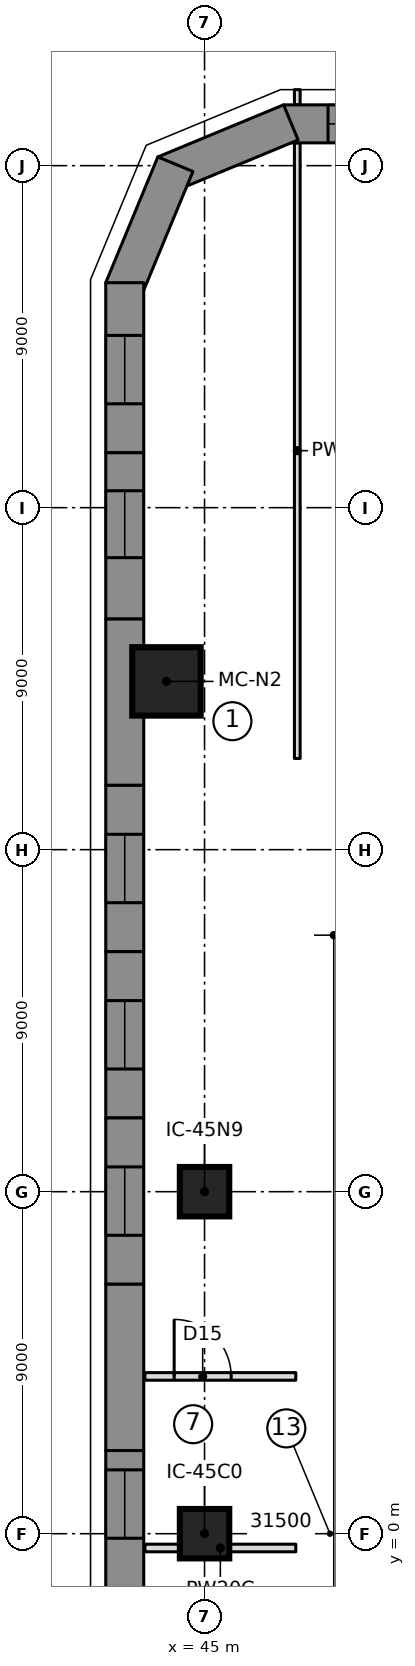
"""IFC4 building model, lengths in metres.
Left out: names, types, materials, properties, quantities, classifications, styles, units other than length and angle.
Written with IfcOpenShell. Run it as: python <this file> out.ifc"""

import sys

from ifc_helpers import new_model, si_unit, direction, frame, frame_2d, origin, origin_2d, place, context, subcontext, project, spatial, polyline, rectangle, outline, extrude, element, fill, save


model = new_model("IFC4")
c1 = context("Model", 3, precision=1e-05, world=origin(), true_north=direction((0.0, 1.0)))
c2 = subcontext(c1, "Body", "Model", "MODEL_VIEW")
j1 = project(units=[si_unit("LENGTHUNIT", "METRE"), si_unit("PLANEANGLEUNIT", "RADIAN")], contexts=[c1])
p1 = place(None, origin())
s1 = spatial("IfcSite", under=j1, at=p1, CompositionType="ELEMENT")
p2 = place(p1, origin())
s2 = spatial("IfcBuilding", under=s1, at=p2, CompositionType="ELEMENT")
p3 = place(p2, frame((0.0, 0.0, 24.0)))
s3 = spatial("IfcBuildingStorey", under=s2, at=p3, CompositionType="ELEMENT", Elevation=24.0)
p4 = place(p3, frame((43.998, 22.428, 0.0), z_axis=(0.0, 0.0, 1.0), x_axis=(1.0, 0.0, 0.0)))
e1 = element("IfcColumn", 1, at=p4, inside=s3, PredefinedType="COLUMN", context=c2, shape_type="SweptSolid", body=[
    extrude(rectangle(XDim=1.8, YDim=1.8, at=origin_2d()), origin(), (0.0, 0.0, 1.0), 5.0),
])
for number, where, z_axis, x_axis in (
    (2, (45.0, 0.0, 0.0), (0.0, 0.0, 1.0), (1.0, 0.0, 0.0)),
    (3, (45.0, 9.0, 0.0), (0.0, 0.0, 1.0), (1.0, 0.0, 0.0)),
):
    element("IfcColumn", number, at=place(p3, frame(where, z_axis=z_axis, x_axis=x_axis)), inside=s3, PredefinedType="COLUMN", context=c2, shape_type="SweptSolid", body=[
        extrude(rectangle(XDim=1.3, YDim=1.3, at=origin_2d()), origin(), (0.0, 0.0, 1.0), 5.0),
    ])
p5 = place(p3, frame((51.119, 37.1, 0.0), z_axis=(0.0, 0.0, 1.0), x_axis=(-1.0, 0.0, 0.0)))
e4 = element("IfcWall", 4, at=p5, inside=s3, PredefinedType="NOTDEFINED", context=c2, shape_type="SweptSolid", body=[
    extrude(outline(polyline([(0.0, -0.5), (4.04, -0.5), (3.841, 0.5), (0.0, 0.5), (0.0, -0.5)])), origin(), (0.0, 0.0, 1.0), 4.7),
])
p6 = place(p5, frame((1.07, 0.0, 0.9)))
e5 = element("IfcOpeningElement", 5, at=p6, cuts=e4, PredefinedType="OPENING", context=c2, shape_type="SweptSolid", body=[
    extrude(rectangle(XDim=1.8, YDim=2.4, at=frame_2d((0.9, 1.2))), frame((0.0, 0.51, 0.0), z_axis=(0.0, -1.0, 0.0), x_axis=(1.0, 0.0, 0.0)), (0.0, 0.0, 1.0), 1.02),
])
p7 = place(p3, frame((47.179, 37.1, 0.0), z_axis=(0.0, 0.0, 1.0), x_axis=(-0.923862365102, -0.382724875529, 0.0)))
e6 = element("IfcWall", 6, at=p7, inside=s3, PredefinedType="NOTDEFINED", context=c2, shape_type="SweptSolid", body=[
    extrude(outline(polyline([(-0.1, -0.5), (3.482, -0.5), (3.068, 0.5), (0.1, 0.5), (-0.1, -0.5)])), origin(), (0.0, 0.0, 1.0), 4.7),
])
p8 = place(p3, frame((44.153, 35.847, 0.0), z_axis=(0.0, 0.0, 1.0), x_axis=(-0.382724875529, -0.923862365102, 0.0)))
e7 = element("IfcWall", 7, at=p8, inside=s3, PredefinedType="NOTDEFINED", context=c2, shape_type="SweptSolid", body=[
    extrude(outline(polyline([(-0.207, -0.5), (3.375, -0.5), (3.175, 0.5), (0.207, 0.5), (-0.207, -0.5)])), origin(), (0.0, 0.0, 1.0), 4.7),
])
p9 = place(p3, frame((42.9, 32.821, 0.0), z_axis=(0.0, 0.0, 1.0), x_axis=(0.0, -1.0, 0.0)))
e8 = element("IfcWall", 8, at=p9, inside=s3, PredefinedType="NOTDEFINED", context=c2, shape_type="SweptSolid", body=[
    extrude(outline(polyline([(-0.1, -0.5), (4.376, -0.5), (4.376, 0.5), (0.1, 0.5), (-0.1, -0.5)])), origin(), (0.0, 0.0, 1.0), 4.7),
])
p10 = place(p9, frame((1.288, 0.0, 0.9)))
e9 = element("IfcOpeningElement", 9, at=p10, cuts=e8, PredefinedType="OPENING", context=c2, shape_type="SweptSolid", body=[
    extrude(rectangle(XDim=1.8, YDim=2.4, at=frame_2d((0.9, 1.2))), frame((0.0, 0.51, 0.0), z_axis=(0.0, -1.0, 0.0), x_axis=(1.0, 0.0, 0.0)), (0.0, 0.0, 1.0), 1.02),
])
p11 = place(p3, frame((42.9, 28.445, 0.0), z_axis=(0.0, 0.0, 1.0), x_axis=(0.0, -1.0, 0.0)))
e10 = element("IfcWall", 10, at=p11, inside=s3, PredefinedType="NOTDEFINED", context=c2, shape_type="SweptSolid", body=[
    extrude(outline(polyline([(0.0, -0.5), (4.376, -0.5), (4.376, 0.5), (0.0, 0.5), (0.0, -0.5)])), origin(), (0.0, 0.0, 1.0), 4.7),
])
p12 = place(p11, frame((1.0, 0.0, 0.9)))
e11 = element("IfcOpeningElement", 11, at=p12, cuts=e10, PredefinedType="OPENING", context=c2, shape_type="SweptSolid", body=[
    extrude(rectangle(XDim=1.76, YDim=2.4, at=frame_2d((0.88, 1.2))), frame((0.0, 0.51, 0.0), z_axis=(0.0, -1.0, 0.0), x_axis=(1.0, 0.0, 0.0)), (0.0, 0.0, 1.0), 1.02),
])
p13 = place(p3, frame((42.9, 24.069, 0.0), z_axis=(0.0, 0.0, 1.0), x_axis=(0.0, -1.0, 0.0)))
e12 = element("IfcWall", 12, at=p13, inside=s3, PredefinedType="NOTDEFINED", context=c2, shape_type="SweptSolid", body=[
    extrude(outline(polyline([(0.0, -0.5), (4.376, -0.5), (4.376, 0.5), (0.0, 0.5), (0.0, -0.5)])), origin(), (0.0, 0.0, 1.0), 4.7),
])
p14 = place(p3, frame((42.9, 19.693, 0.0), z_axis=(0.0, 0.0, 1.0), x_axis=(0.0, -1.0, 0.0)))
e13 = element("IfcWall", 13, at=p14, inside=s3, PredefinedType="NOTDEFINED", context=c2, shape_type="SweptSolid", body=[
    extrude(outline(polyline([(0.0, -0.5), (4.376, -0.5), (4.376, 0.5), (0.0, 0.5), (0.0, -0.5)])), origin(), (0.0, 0.0, 1.0), 4.7),
])
p15 = place(p14, frame((1.288, 0.0, 0.9)))
e14 = element("IfcOpeningElement", 14, at=p15, cuts=e13, PredefinedType="OPENING", context=c2, shape_type="SweptSolid", body=[
    extrude(rectangle(XDim=1.8, YDim=2.4, at=frame_2d((0.9, 1.2))), frame((0.0, 0.51, 0.0), z_axis=(0.0, -1.0, 0.0), x_axis=(1.0, 0.0, 0.0)), (0.0, 0.0, 1.0), 1.02),
])
p16 = place(p3, frame((42.9, 15.316, 0.0), z_axis=(0.0, 0.0, 1.0), x_axis=(0.0, -1.0, 0.0)))
e15 = element("IfcWall", 15, at=p16, inside=s3, PredefinedType="NOTDEFINED", context=c2, shape_type="SweptSolid", body=[
    extrude(outline(polyline([(0.0, -0.5), (4.376, -0.5), (4.376, 0.5), (0.0, 0.5), (0.0, -0.5)])), origin(), (0.0, 0.0, 1.0), 4.7),
])
p17 = place(p16, frame((1.288, 0.0, 0.9)))
e16 = element("IfcOpeningElement", 16, at=p17, cuts=e15, PredefinedType="OPENING", context=c2, shape_type="SweptSolid", body=[
    extrude(rectangle(XDim=1.8, YDim=2.4, at=frame_2d((0.9, 1.2))), frame((0.0, 0.51, 0.0), z_axis=(0.0, -1.0, 0.0), x_axis=(1.0, 0.0, 0.0)), (0.0, 0.0, 1.0), 1.02),
])
p18 = place(p3, frame((42.9, 10.94, 0.0), z_axis=(0.0, 0.0, 1.0), x_axis=(0.0, -1.0, 0.0)))
e17 = element("IfcWall", 17, at=p18, inside=s3, PredefinedType="NOTDEFINED", context=c2, shape_type="SweptSolid", body=[
    extrude(outline(polyline([(0.0, -0.5), (4.376, -0.5), (4.376, 0.5), (0.0, 0.5), (0.0, -0.5)])), origin(), (0.0, 0.0, 1.0), 4.7),
])
p19 = place(p18, frame((1.288, 0.0, 0.9)))
e18 = element("IfcOpeningElement", 18, at=p19, cuts=e17, PredefinedType="OPENING", context=c2, shape_type="SweptSolid", body=[
    extrude(rectangle(XDim=1.8, YDim=2.4, at=frame_2d((0.9, 1.2))), frame((0.0, 0.51, 0.0), z_axis=(0.0, -1.0, 0.0), x_axis=(1.0, 0.0, 0.0)), (0.0, 0.0, 1.0), 1.02),
])
p20 = place(p3, frame((42.9, 6.564, 0.0), z_axis=(0.0, 0.0, 1.0), x_axis=(0.0, -1.0, 0.0)))
e19 = element("IfcWall", 19, at=p20, inside=s3, PredefinedType="NOTDEFINED", context=c2, shape_type="SweptSolid", body=[
    extrude(outline(polyline([(0.0, -0.5), (4.376, -0.5), (4.376, 0.5), (0.0, 0.5), (0.0, -0.5)])), origin(), (0.0, 0.0, 1.0), 4.7),
])
p21 = place(p3, frame((42.9, 2.188, 0.0), z_axis=(0.0, 0.0, 1.0), x_axis=(0.0, -1.0, 0.0)))
e20 = element("IfcWall", 20, at=p21, inside=s3, PredefinedType="NOTDEFINED", context=c2, shape_type="SweptSolid", body=[
    extrude(outline(polyline([(0.0, -0.5), (4.376, -0.5), (4.376, 0.5), (0.0, 0.5), (0.0, -0.5)])), origin(), (0.0, 0.0, 1.0), 4.7),
])
p22 = place(p21, frame((0.508, 0.0, 0.9)))
e21 = element("IfcOpeningElement", 21, at=p22, cuts=e20, PredefinedType="OPENING", context=c2, shape_type="SweptSolid", body=[
    extrude(rectangle(XDim=1.8, YDim=2.4, at=frame_2d((0.9, 1.2))), frame((0.0, 0.51, 0.0), z_axis=(0.0, -1.0, 0.0), x_axis=(1.0, 0.0, 0.0)), (0.0, 0.0, 1.0), 1.02),
])
p23 = place(p3, frame((43.43, -0.376, 0.0), z_axis=(0.0, 0.0, 1.0), x_axis=(1.0, 0.0, 0.0)))
e22 = element("IfcWall", 22, at=p23, inside=s3, PredefinedType="PARTITIONING", context=c2, shape_type="SweptSolid", body=[
    extrude(rectangle(XDim=3.971, YDim=0.2, at=frame_2d((1.985, 0.0))), origin(), (0.0, 0.0, 1.0), 4.55),
])
p24 = place(p3, frame((43.43, 4.139, 0.0), z_axis=(0.0, 0.0, 1.0), x_axis=(1.0, 0.0, 0.0)))
e23 = element("IfcWall", 23, at=p24, inside=s3, PredefinedType="PARTITIONING", context=c2, shape_type="SweptSolid", body=[
    extrude(rectangle(XDim=3.971, YDim=0.2, at=frame_2d((1.985, 0.0))), origin(), (0.0, 0.0, 1.0), 4.55),
])
p25 = place(p24, frame((0.771, 0.0, 0.0)))
e24 = element("IfcOpeningElement", 24, at=p25, cuts=e23, PredefinedType="OPENING", context=c2, shape_type="SweptSolid", body=[
    extrude(rectangle(XDim=1.5, YDim=2.1, at=frame_2d((0.75, 1.05))), frame((0.0, 0.11, 0.0), z_axis=(0.0, -1.0, 0.0), x_axis=(1.0, 0.0, 0.0)), (0.0, 0.0, 1.0), 0.22),
])
p26 = place(p3, frame((47.44, 20.4, 0.0), z_axis=(0.0, 0.0, 1.0), x_axis=(0.0, 1.0, 0.0)))
e25 = element("IfcWall", 25, at=p26, inside=s3, PredefinedType="PARTITIONING", context=c2, shape_type="SweptSolid", body=[
    extrude(rectangle(XDim=16.2, YDim=0.15, at=frame_2d((8.1, 0.0))), origin(), (0.0, 0.0, 1.0), 4.55),
])
p27 = place(p3, frame((47.44, 37.6, 0.0), z_axis=(0.0, 0.0, 1.0), x_axis=(0.0, 1.0, 0.0)))
e26 = element("IfcWall", 26, at=p27, inside=s3, PredefinedType="PARTITIONING", context=c2, shape_type="SweptSolid", body=[
    extrude(rectangle(XDim=0.4, YDim=0.15, at=frame_2d((0.2, 0.0))), origin(), (0.0, 0.0, 1.0), 4.55),
])
p28 = place(p6, origin())
e27 = element("IfcWindow", 27, at=p28, inside=s3, PartitioningType="SINGLE_PANEL", PredefinedType="WINDOW", context=c2, shape_type="SweptSolid", body=[
    extrude(rectangle(XDim=1.8, YDim=2.4, at=frame_2d((0.9, 1.2))), frame((0.0, 0.5, 0.0), z_axis=(0.0, -1.0, 0.0), x_axis=(1.0, 0.0, 0.0)), (0.0, 0.0, 1.0), 0.06),
])
fill(e5, e27)
p29 = place(p10, origin())
e28 = element("IfcWindow", 28, at=p29, inside=s3, PartitioningType="SINGLE_PANEL", PredefinedType="WINDOW", context=c2, shape_type="SweptSolid", body=[
    extrude(rectangle(XDim=1.8, YDim=2.4, at=frame_2d((0.9, 1.2))), frame((0.0, 0.5, 0.0), z_axis=(0.0, -1.0, 0.0), x_axis=(1.0, 0.0, 0.0)), (0.0, 0.0, 1.0), 0.06),
])
fill(e9, e28)
p30 = place(p12, origin())
e29 = element("IfcWindow", 29, at=p30, inside=s3, PartitioningType="SINGLE_PANEL", PredefinedType="WINDOW", context=c2, shape_type="SweptSolid", body=[
    extrude(rectangle(XDim=1.76, YDim=2.4, at=frame_2d((0.88, 1.2))), frame((0.0, 0.5, 0.0), z_axis=(0.0, -1.0, 0.0), x_axis=(1.0, 0.0, 0.0)), (0.0, 0.0, 1.0), 0.06),
])
fill(e11, e29)
p31 = place(p15, origin())
e30 = element("IfcWindow", 30, at=p31, inside=s3, PartitioningType="SINGLE_PANEL", PredefinedType="WINDOW", context=c2, shape_type="SweptSolid", body=[
    extrude(rectangle(XDim=1.8, YDim=2.4, at=frame_2d((0.9, 1.2))), frame((0.0, 0.5, 0.0), z_axis=(0.0, -1.0, 0.0), x_axis=(1.0, 0.0, 0.0)), (0.0, 0.0, 1.0), 0.06),
])
fill(e14, e30)
p32 = place(p17, origin())
e31 = element("IfcWindow", 31, at=p32, inside=s3, PartitioningType="SINGLE_PANEL", PredefinedType="WINDOW", context=c2, shape_type="SweptSolid", body=[
    extrude(rectangle(XDim=1.8, YDim=2.4, at=frame_2d((0.9, 1.2))), frame((0.0, 0.5, 0.0), z_axis=(0.0, -1.0, 0.0), x_axis=(1.0, 0.0, 0.0)), (0.0, 0.0, 1.0), 0.06),
])
fill(e16, e31)
p33 = place(p19, origin())
e32 = element("IfcWindow", 32, at=p33, inside=s3, PartitioningType="SINGLE_PANEL", PredefinedType="WINDOW", context=c2, shape_type="SweptSolid", body=[
    extrude(rectangle(XDim=1.8, YDim=2.4, at=frame_2d((0.9, 1.2))), frame((0.0, 0.5, 0.0), z_axis=(0.0, -1.0, 0.0), x_axis=(1.0, 0.0, 0.0)), (0.0, 0.0, 1.0), 0.06),
])
fill(e18, e32)
p34 = place(p22, origin())
e33 = element("IfcWindow", 33, at=p34, inside=s3, PartitioningType="SINGLE_PANEL", PredefinedType="WINDOW", context=c2, shape_type="SweptSolid", body=[
    extrude(rectangle(XDim=1.8, YDim=2.4, at=frame_2d((0.9, 1.2))), frame((0.0, 0.5, 0.0), z_axis=(0.0, -1.0, 0.0), x_axis=(1.0, 0.0, 0.0)), (0.0, 0.0, 1.0), 0.06),
])
fill(e21, e33)
p35 = place(p25, origin())
e34 = element("IfcDoor", 34, at=p35, inside=s3, OperationType="DOUBLE_DOOR_SINGLE_SWING", PredefinedType="DOOR", context=c2, shape_type="SweptSolid", body=[
    extrude(rectangle(XDim=1.5, YDim=2.1, at=frame_2d((0.75, 1.05))), frame((0.0, 0.025, 0.0), z_axis=(0.0, -1.0, 0.0), x_axis=(1.0, 0.0, 0.0)), (0.0, 0.0, 1.0), 0.05),
])
fill(e24, e34)
save(model, sys.argv[1])
